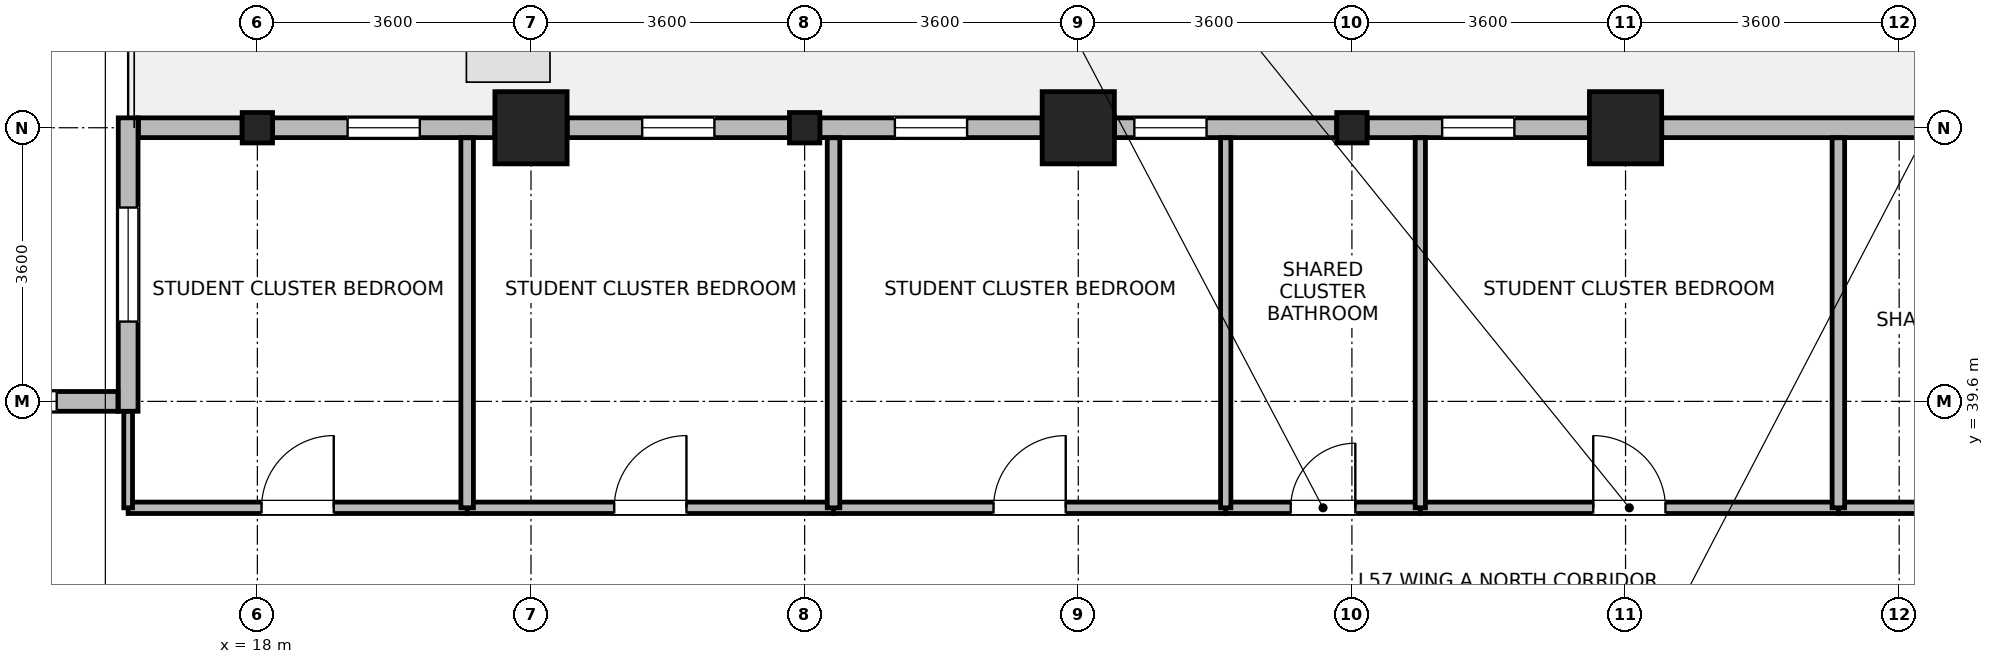
"""IFC4 building model, lengths in metres.
Left out: names, types, materials, properties, quantities, classifications, styles, units other than length and angle.
Written with IfcOpenShell. Run it as: python <this file> out.ifc"""

import sys

from ifc_helpers import new_model, si_unit, direction, frame, frame_2d, origin, origin_2d, place, context, subcontext, project, spatial, rectangle, i_section, extrude, source, transform, mapped, element, fill, save


model = new_model("IFC4")
c1 = context("Model", 3, precision=1e-05, world=origin(), true_north=direction((0.0, 1.0)))
c2 = subcontext(c1, "Body", "Model", "MODEL_VIEW")
j1 = project(units=[si_unit("LENGTHUNIT", "METRE"), si_unit("PLANEANGLEUNIT", "RADIAN")], contexts=[c1])
p1 = place(None, origin())
s1 = spatial("IfcSite", under=j1, at=p1, CompositionType="ELEMENT")
p2 = place(p1, origin())
s2 = spatial("IfcBuilding", under=s1, at=p2, CompositionType="ELEMENT")
p3 = place(p2, frame((0.0, 0.0, 224.0)))
s3 = spatial("IfcBuildingStorey", under=s2, at=p3, CompositionType="ELEMENT", Elevation=224.0)
m1 = source(origin(), c2, "Body", "SweptSolid", [
    extrude(rectangle(XDim=0.95, YDim=0.95, at=origin_2d()), origin(), (0.0, 0.0, 1.0), 3.7),
])
for number, where, z_axis, x_axis in (
    (1, (21.6, 43.2, 0.0), (0.0, 0.0, 1.0), (1.0, 0.0, 0.0)),
    (2, (28.8, 43.2, 0.0), (0.0, 0.0, 1.0), (1.0, 0.0, 0.0)),
    (3, (36.0, 43.2, 0.0), (0.0, 0.0, 1.0), (1.0, 0.0, 0.0)),
):
    element("IfcColumn", number, at=place(p3, frame(where, z_axis=z_axis, x_axis=x_axis)), inside=s3, PredefinedType="COLUMN", context=c2, shape_type="MappedRepresentation", body=[
        mapped(m1, transform((0.0, 0.0, 0.0), x_axis=(1.0, 0.0, 0.0), y_axis=(0.0, 1.0, 0.0), z_axis=(0.0, 0.0, 1.0), scale=1.0)),
    ])
m2 = source(origin(), c2, "Body", "SweptSolid", [
    extrude(i_section(OverallWidth=0.399, OverallDepth=0.4, WebThickness=0.017, FlangeThickness=0.023, FilletRadius=0.015, at=origin_2d()), origin(), (0.0, 0.0, 1.0), 3.7),
])
for number, where, z_axis, x_axis in (
    (4, (18.0, 43.2, 0.0), (0.0, 0.0, 1.0), (1.0, 0.0, 0.0)),
    (5, (25.2, 43.2, 0.0), (0.0, 0.0, 1.0), (1.0, 0.0, 0.0)),
    (6, (32.4, 43.2, 0.0), (0.0, 0.0, 1.0), (1.0, 0.0, 0.0)),
):
    element("IfcColumn", number, at=place(p3, frame(where, z_axis=z_axis, x_axis=x_axis)), inside=s3, PredefinedType="COLUMN", context=c2, shape_type="MappedRepresentation", body=[
        mapped(m2, transform((0.0, 0.0, 0.0), x_axis=(1.0, 0.0, 0.0), y_axis=(0.0, 1.0, 0.0), z_axis=(0.0, 0.0, 1.0), scale=1.0)),
    ])
p4 = place(p3, frame((36.476, 43.2, 0.0), z_axis=(0.0, 0.0, 1.0), x_axis=(1.0, 0.0, 0.0)))
e7 = element("IfcWall", 7, at=p4, inside=s3, PredefinedType="STANDARD", context=c2, shape_type="SweptSolid", body=[
    extrude(rectangle(XDim=9.848, YDim=0.26, at=frame_2d((4.924, 0.0))), origin(), (0.0, 0.0, 1.0), 3.05),
])
p5 = place(p4, frame((4.174, 0.0, 0.85)))
e8 = element("IfcOpeningElement", 8, at=p5, cuts=e7, PredefinedType="OPENING", context=c2, shape_type="SweptSolid", body=[
    extrude(rectangle(XDim=1.5, YDim=1.85, at=frame_2d((0.75, 0.925))), frame((0.0, 0.14, 0.0), z_axis=(0.0, -1.0, 0.0), x_axis=(1.0, 0.0, 0.0)), (0.0, 0.0, 1.0), 0.28),
])
p6 = place(p4, frame((7.457, 0.0, 0.85)))
e9 = element("IfcOpeningElement", 9, at=p6, cuts=e7, PredefinedType="OPENING", context=c2, shape_type="SweptSolid", body=[
    extrude(rectangle(XDim=1.5, YDim=1.85, at=frame_2d((0.75, 0.925))), frame((0.0, 0.14, 0.0), z_axis=(0.0, -1.0, 0.0), x_axis=(1.0, 0.0, 0.0)), (0.0, 0.0, 1.0), 0.28),
])
p7 = place(p3, frame((32.601, 43.2, 0.0), z_axis=(0.0, 0.0, 1.0), x_axis=(1.0, 0.0, 0.0)))
e10 = element("IfcWall", 10, at=p7, inside=s3, PredefinedType="STANDARD", context=c2, shape_type="SweptSolid", body=[
    extrude(rectangle(XDim=2.923, YDim=0.26, at=frame_2d((1.462, 0.0))), origin(), (0.0, 0.0, 1.0), 3.05),
])
p8 = place(p7, frame((0.987, 0.0, 0.85)))
e11 = element("IfcOpeningElement", 11, at=p8, cuts=e10, PredefinedType="OPENING", context=c2, shape_type="SweptSolid", body=[
    extrude(rectangle(XDim=0.95, YDim=1.75, at=frame_2d((0.475, 0.875))), frame((0.0, 0.14, 0.0), z_axis=(0.0, -1.0, 0.0), x_axis=(1.0, 0.0, 0.0)), (0.0, 0.0, 1.0), 0.28),
])
p9 = place(p3, frame((29.276, 43.2, 0.0), z_axis=(0.0, 0.0, 1.0), x_axis=(1.0, 0.0, 0.0)))
e12 = element("IfcWall", 12, at=p9, inside=s3, PredefinedType="STANDARD", context=c2, shape_type="SweptSolid", body=[
    extrude(rectangle(XDim=2.924, YDim=0.26, at=frame_2d((1.462, 0.0))), origin(), (0.0, 0.0, 1.0), 3.05),
])
p10 = place(p9, frame((0.262, 0.0, 0.85)))
e13 = element("IfcOpeningElement", 13, at=p10, cuts=e12, PredefinedType="OPENING", context=c2, shape_type="SweptSolid", body=[
    extrude(rectangle(XDim=0.95, YDim=1.75, at=frame_2d((0.475, 0.875))), frame((0.0, 0.14, 0.0), z_axis=(0.0, -1.0, 0.0), x_axis=(1.0, 0.0, 0.0)), (0.0, 0.0, 1.0), 0.28),
])
p11 = place(p3, frame((25.4, 43.2, 0.0), z_axis=(0.0, 0.0, 1.0), x_axis=(1.0, 0.0, 0.0)))
e14 = element("IfcWall", 14, at=p11, inside=s3, PredefinedType="STANDARD", context=c2, shape_type="SweptSolid", body=[
    extrude(rectangle(XDim=2.924, YDim=0.26, at=frame_2d((1.462, 0.0))), origin(), (0.0, 0.0, 1.0), 3.05),
])
p12 = place(p11, frame((0.987, 0.0, 0.85)))
e15 = element("IfcOpeningElement", 15, at=p12, cuts=e14, PredefinedType="OPENING", context=c2, shape_type="SweptSolid", body=[
    extrude(rectangle(XDim=0.95, YDim=1.75, at=frame_2d((0.475, 0.875))), frame((0.0, 0.14, 0.0), z_axis=(0.0, -1.0, 0.0), x_axis=(1.0, 0.0, 0.0)), (0.0, 0.0, 1.0), 0.28),
])
p13 = place(p3, frame((22.076, 43.2, 0.0), z_axis=(0.0, 0.0, 1.0), x_axis=(1.0, 0.0, 0.0)))
e16 = element("IfcWall", 16, at=p13, inside=s3, PredefinedType="STANDARD", context=c2, shape_type="SweptSolid", body=[
    extrude(rectangle(XDim=2.924, YDim=0.26, at=frame_2d((1.462, 0.0))), origin(), (0.0, 0.0, 1.0), 3.05),
])
p14 = place(p13, frame((0.987, 0.0, 0.85)))
e17 = element("IfcOpeningElement", 17, at=p14, cuts=e16, PredefinedType="OPENING", context=c2, shape_type="SweptSolid", body=[
    extrude(rectangle(XDim=0.95, YDim=1.75, at=frame_2d((0.475, 0.875))), frame((0.0, 0.14, 0.0), z_axis=(0.0, -1.0, 0.0), x_axis=(1.0, 0.0, 0.0)), (0.0, 0.0, 1.0), 0.28),
])
p15 = place(p3, frame((18.2, 43.2, 0.0), z_axis=(0.0, 0.0, 1.0), x_axis=(1.0, 0.0, 0.0)))
e18 = element("IfcWall", 18, at=p15, inside=s3, PredefinedType="STANDARD", context=c2, shape_type="SweptSolid", body=[
    extrude(rectangle(XDim=2.924, YDim=0.26, at=frame_2d((1.462, 0.0))), origin(), (0.0, 0.0, 1.0), 3.05),
])
p16 = place(p15, frame((0.987, 0.0, 0.85)))
e19 = element("IfcOpeningElement", 19, at=p16, cuts=e18, PredefinedType="OPENING", context=c2, shape_type="SweptSolid", body=[
    extrude(rectangle(XDim=0.95, YDim=1.75, at=frame_2d((0.475, 0.875))), frame((0.0, 0.14, 0.0), z_axis=(0.0, -1.0, 0.0), x_axis=(1.0, 0.0, 0.0)), (0.0, 0.0, 1.0), 0.28),
])
p17 = place(p3, frame((16.435, 43.2, 0.0), z_axis=(0.0, 0.0, 1.0), x_axis=(1.0, 0.0, 0.0)))
e20 = element("IfcWall", 20, at=p17, inside=s3, PredefinedType="STANDARD", context=c2, shape_type="SweptSolid", body=[
    extrude(rectangle(XDim=1.365, YDim=0.26, at=frame_2d((0.682, 0.0))), origin(), (0.0, 0.0, 1.0), 3.05),
])
p18 = place(p3, frame((16.3, 39.47, 0.0), z_axis=(0.0, 0.0, 1.0), x_axis=(0.0, 1.0, 0.0)))
e21 = element("IfcWall", 21, at=p18, inside=s3, PredefinedType="STANDARD", context=c2, shape_type="SweptSolid", body=[
    extrude(rectangle(XDim=3.86, YDim=0.26, at=frame_2d((1.93, 0.0))), origin(), (0.0, 0.0, 1.0), 3.45),
])
p19 = place(p18, frame((1.18, 0.0, 0.85)))
e22 = element("IfcOpeningElement", 22, at=p19, cuts=e21, PredefinedType="OPENING", context=c2, shape_type="SweptSolid", body=[
    extrude(rectangle(XDim=1.5, YDim=1.85, at=frame_2d((0.75, 0.925))), frame((0.0, 0.14, 0.0), z_axis=(0.0, -1.0, 0.0), x_axis=(1.0, 0.0, 0.0)), (0.0, 0.0, 1.0), 0.28),
])
p20 = place(p3, frame((6.835, 39.6, 0.0), z_axis=(0.0, 0.0, 1.0), x_axis=(1.0, 0.0, 0.0)))
e23 = element("IfcWall", 23, at=p20, inside=s3, PredefinedType="STANDARD", context=c2, shape_type="SweptSolid", body=[
    extrude(rectangle(XDim=9.33, YDim=0.26, at=frame_2d((4.665, 0.0))), origin(), (0.0, 0.0, 1.0), 3.45),
])
p21 = place(p20, frame((0.805, 0.0, 0.85)))
e24 = element("IfcOpeningElement", 24, at=p21, cuts=e23, PredefinedType="OPENING", context=c2, shape_type="SweptSolid", body=[
    extrude(rectangle(XDim=1.5, YDim=1.85, at=frame_2d((0.75, 0.925))), frame((0.0, 0.14, 0.0), z_axis=(0.0, -1.0, 0.0), x_axis=(1.0, 0.0, 0.0)), (0.0, 0.0, 1.0), 0.28),
])
p22 = place(p20, frame((3.915, 0.0, 0.85)))
e25 = element("IfcOpeningElement", 25, at=p22, cuts=e23, PredefinedType="OPENING", context=c2, shape_type="SweptSolid", body=[
    extrude(rectangle(XDim=1.5, YDim=1.85, at=frame_2d((0.75, 0.925))), frame((0.0, 0.14, 0.0), z_axis=(0.0, -1.0, 0.0), x_axis=(1.0, 0.0, 0.0)), (0.0, 0.0, 1.0), 0.28),
])
p23 = place(p20, frame((7.025, 0.0, 0.85)))
e26 = element("IfcOpeningElement", 26, at=p23, cuts=e23, PredefinedType="OPENING", context=c2, shape_type="SweptSolid", body=[
    extrude(rectangle(XDim=1.5, YDim=1.85, at=frame_2d((0.75, 0.925))), frame((0.0, 0.14, 0.0), z_axis=(0.0, -1.0, 0.0), x_axis=(1.0, 0.0, 0.0)), (0.0, 0.0, 1.0), 0.28),
])
p24 = place(p3, frame((38.8, 38.2, 0.0), z_axis=(0.0, 0.0, 1.0), x_axis=(1.0, 0.0, 0.0)))
e27 = element("IfcWall", 27, at=p24, inside=s3, PredefinedType="PARTITIONING", context=c2, shape_type="SweptSolid", body=[
    extrude(rectangle(XDim=10.44, YDim=0.15, at=frame_2d((5.22, 0.0))), origin(), (0.0, 0.0, 1.0), 3.45),
])
p25 = place(p24, frame((4.77, 0.0, 0.0)))
e28 = element("IfcOpeningElement", 28, at=p25, cuts=e27, PredefinedType="OPENING", context=c2, shape_type="SweptSolid", body=[
    extrude(rectangle(XDim=0.9, YDim=2.08, at=frame_2d((0.45, 1.04))), frame((0.0, 0.085, 0.0), z_axis=(0.0, -1.0, 0.0), x_axis=(1.0, 0.0, 0.0)), (0.0, 0.0, 1.0), 0.17),
])
p26 = place(p3, frame((33.3, 38.2, 0.0), z_axis=(0.0, 0.0, 1.0), x_axis=(1.0, 0.0, 0.0)))
e29 = element("IfcWall", 29, at=p26, inside=s3, PredefinedType="PARTITIONING", context=c2, shape_type="SweptSolid", body=[
    extrude(rectangle(XDim=5.5, YDim=0.15, at=frame_2d((2.75, 0.0))), origin(), (0.0, 0.0, 1.0), 3.45),
])
p27 = place(p26, frame((2.275, 0.0, 0.0)))
e30 = element("IfcOpeningElement", 30, at=p27, cuts=e29, PredefinedType="OPENING", context=c2, shape_type="SweptSolid", body=[
    extrude(rectangle(XDim=0.95, YDim=2.1, at=frame_2d((0.475, 1.05))), frame((0.0, 0.085, 0.0), z_axis=(0.0, -1.0, 0.0), x_axis=(1.0, 0.0, 0.0)), (0.0, 0.0, 1.0), 0.17),
])
p28 = place(p3, frame((25.58, 38.2, 0.0), z_axis=(0.0, 0.0, 1.0), x_axis=(1.0, 0.0, 0.0)))
e31 = element("IfcWall", 31, at=p28, inside=s3, PredefinedType="PARTITIONING", context=c2, shape_type="SweptSolid", body=[
    extrude(rectangle(XDim=5.16, YDim=0.15, at=frame_2d((2.58, 0.0))), origin(), (0.0, 0.0, 1.0), 3.45),
])
p29 = place(p28, frame((2.105, 0.0, 0.0)))
e32 = element("IfcOpeningElement", 32, at=p29, cuts=e31, PredefinedType="OPENING", context=c2, shape_type="SweptSolid", body=[
    extrude(rectangle(XDim=0.95, YDim=2.1, at=frame_2d((0.475, 1.05))), frame((0.0, 0.085, 0.0), z_axis=(0.0, -1.0, 0.0), x_axis=(1.0, 0.0, 0.0)), (0.0, 0.0, 1.0), 0.17),
])
p30 = place(p3, frame((20.76, 38.2, 0.0), z_axis=(0.0, 0.0, 1.0), x_axis=(1.0, 0.0, 0.0)))
e33 = element("IfcWall", 33, at=p30, inside=s3, PredefinedType="PARTITIONING", context=c2, shape_type="SweptSolid", body=[
    extrude(rectangle(XDim=4.82, YDim=0.15, at=frame_2d((2.41, 0.0))), origin(), (0.0, 0.0, 1.0), 3.45),
])
p31 = place(p30, frame((1.935, 0.0, 0.0)))
e34 = element("IfcOpeningElement", 34, at=p31, cuts=e33, PredefinedType="OPENING", context=c2, shape_type="SweptSolid", body=[
    extrude(rectangle(XDim=0.95, YDim=2.1, at=frame_2d((0.475, 1.05))), frame((0.0, 0.085, 0.0), z_axis=(0.0, -1.0, 0.0), x_axis=(1.0, 0.0, 0.0)), (0.0, 0.0, 1.0), 0.17),
])
p32 = place(p3, frame((16.3, 38.2, 0.0), z_axis=(0.0, 0.0, 1.0), x_axis=(1.0, 0.0, 0.0)))
e35 = element("IfcWall", 35, at=p32, inside=s3, PredefinedType="PARTITIONING", context=c2, shape_type="SweptSolid", body=[
    extrude(rectangle(XDim=4.46, YDim=0.15, at=frame_2d((2.23, 0.0))), origin(), (0.0, 0.0, 1.0), 3.45),
])
p33 = place(p32, frame((1.755, 0.0, 0.0)))
e36 = element("IfcOpeningElement", 36, at=p33, cuts=e35, PredefinedType="OPENING", context=c2, shape_type="SweptSolid", body=[
    extrude(rectangle(XDim=0.95, YDim=2.1, at=frame_2d((0.475, 1.05))), frame((0.0, 0.085, 0.0), z_axis=(0.0, -1.0, 0.0), x_axis=(1.0, 0.0, 0.0)), (0.0, 0.0, 1.0), 0.17),
])
p34 = place(p3, frame((30.74, 38.2, 0.0), z_axis=(0.0, 0.0, 1.0), x_axis=(1.0, 0.0, 0.0)))
e37 = element("IfcWall", 37, at=p34, inside=s3, PredefinedType="PARTITIONING", context=c2, shape_type="SweptSolid", body=[
    extrude(rectangle(XDim=2.56, YDim=0.15, at=frame_2d((1.28, 0.0))), origin(), (0.0, 0.0, 1.0), 3.45),
])
p35 = place(p34, frame((0.855, 0.0, 0.0)))
e38 = element("IfcOpeningElement", 38, at=p35, cuts=e37, PredefinedType="OPENING", context=c2, shape_type="SweptSolid", body=[
    extrude(rectangle(XDim=0.85, YDim=2.04, at=frame_2d((0.425, 1.02))), frame((0.0, 0.085, 0.0), z_axis=(0.0, -1.0, 0.0), x_axis=(1.0, 0.0, 0.0)), (0.0, 0.0, 1.0), 0.17),
])
p36 = place(p3, frame((16.3, 38.2, 0.0), z_axis=(0.0, 0.0, 1.0), x_axis=(0.0, 1.0, 0.0)))
e39 = element("IfcWall", 39, at=p36, inside=s3, PredefinedType="PARTITIONING", context=c2, shape_type="SweptSolid", body=[
    extrude(rectangle(XDim=1.268, YDim=0.115, at=frame_2d((0.634, 0.0))), origin(), (0.0, 0.0, 1.0), 3.45),
])
for number, where, z_axis, x_axis in (
    (40, (20.76, 38.2, 0.0), (0.0, 0.0, 1.0), (0.0, 1.0, 0.0)),
    (41, (25.58, 38.2, 0.0), (0.0, 0.0, 1.0), (0.0, 1.0, 0.0)),
):
    element("IfcWall", number, at=place(p3, frame(where, z_axis=z_axis, x_axis=x_axis)), inside=s3, PredefinedType="PARTITIONING", context=c2, shape_type="SweptSolid", body=[
        extrude(rectangle(XDim=4.868, YDim=0.165, at=frame_2d((2.434, 0.0))), origin(), (0.0, 0.0, 1.0), 3.45),
    ])
for number, where, z_axis, x_axis in (
    (42, (30.74, 38.2, 0.0), (0.0, 0.0, 1.0), (0.0, 1.0, 0.0)),
    (43, (33.3, 38.2, 0.0), (0.0, 0.0, 1.0), (0.0, 1.0, 0.0)),
):
    element("IfcWall", number, at=place(p3, frame(where, z_axis=z_axis, x_axis=x_axis)), inside=s3, PredefinedType="PARTITIONING", context=c2, shape_type="SweptSolid", body=[
        extrude(rectangle(XDim=4.868, YDim=0.135, at=frame_2d((2.434, 0.0))), origin(), (0.0, 0.0, 1.0), 3.45),
    ])
p37 = place(p3, frame((38.8, 38.2, 0.0), z_axis=(0.0, 0.0, 1.0), x_axis=(0.0, 1.0, 0.0)))
e44 = element("IfcWall", 44, at=p37, inside=s3, PredefinedType="PARTITIONING", context=c2, shape_type="SweptSolid", body=[
    extrude(rectangle(XDim=4.868, YDim=0.165, at=frame_2d((2.434, 0.0))), origin(), (0.0, 0.0, 1.0), 3.45),
])
p38 = place(p8, origin())
e45 = element("IfcWindow", 45, at=p38, inside=s3, PartitioningType="SINGLE_PANEL", PredefinedType="WINDOW", context=c2, shape_type="SweptSolid", body=[
    extrude(rectangle(XDim=0.95, YDim=1.75, at=frame_2d((0.475, 0.875))), frame((0.0, 0.03, 0.0), z_axis=(0.0, -1.0, 0.0), x_axis=(1.0, 0.0, 0.0)), (0.0, 0.0, 1.0), 0.06),
])
fill(e11, e45)
p39 = place(p10, origin())
e46 = element("IfcWindow", 46, at=p39, inside=s3, PartitioningType="SINGLE_PANEL", PredefinedType="WINDOW", context=c2, shape_type="SweptSolid", body=[
    extrude(rectangle(XDim=0.95, YDim=1.75, at=frame_2d((0.475, 0.875))), frame((0.0, 0.03, 0.0), z_axis=(0.0, -1.0, 0.0), x_axis=(1.0, 0.0, 0.0)), (0.0, 0.0, 1.0), 0.06),
])
fill(e13, e46)
p40 = place(p12, origin())
e47 = element("IfcWindow", 47, at=p40, inside=s3, PartitioningType="SINGLE_PANEL", PredefinedType="WINDOW", context=c2, shape_type="SweptSolid", body=[
    extrude(rectangle(XDim=0.95, YDim=1.75, at=frame_2d((0.475, 0.875))), frame((0.0, 0.03, 0.0), z_axis=(0.0, -1.0, 0.0), x_axis=(1.0, 0.0, 0.0)), (0.0, 0.0, 1.0), 0.06),
])
fill(e15, e47)
p41 = place(p14, origin())
e48 = element("IfcWindow", 48, at=p41, inside=s3, PartitioningType="SINGLE_PANEL", PredefinedType="WINDOW", context=c2, shape_type="SweptSolid", body=[
    extrude(rectangle(XDim=0.95, YDim=1.75, at=frame_2d((0.475, 0.875))), frame((0.0, 0.03, 0.0), z_axis=(0.0, -1.0, 0.0), x_axis=(1.0, 0.0, 0.0)), (0.0, 0.0, 1.0), 0.06),
])
fill(e17, e48)
p42 = place(p16, origin())
e49 = element("IfcWindow", 49, at=p42, inside=s3, PartitioningType="SINGLE_PANEL", PredefinedType="WINDOW", context=c2, shape_type="SweptSolid", body=[
    extrude(rectangle(XDim=0.95, YDim=1.75, at=frame_2d((0.475, 0.875))), frame((0.0, 0.03, 0.0), z_axis=(0.0, -1.0, 0.0), x_axis=(1.0, 0.0, 0.0)), (0.0, 0.0, 1.0), 0.06),
])
fill(e19, e49)
p43 = place(p19, origin())
e50 = element("IfcWindow", 50, at=p43, inside=s3, PartitioningType="SINGLE_PANEL", PredefinedType="WINDOW", context=c2, shape_type="SweptSolid", body=[
    extrude(rectangle(XDim=1.5, YDim=1.85, at=frame_2d((0.75, 0.925))), frame((0.0, 0.03, 0.0), z_axis=(0.0, -1.0, 0.0), x_axis=(1.0, 0.0, 0.0)), (0.0, 0.0, 1.0), 0.06),
])
fill(e22, e50)
p44 = place(p23, origin())
e51 = element("IfcWindow", 51, at=p44, inside=s3, PartitioningType="SINGLE_PANEL", PredefinedType="WINDOW", context=c2, shape_type="SweptSolid", body=[
    extrude(rectangle(XDim=1.5, YDim=1.85, at=frame_2d((0.75, 0.925))), frame((0.0, 0.03, 0.0), z_axis=(0.0, -1.0, 0.0), x_axis=(1.0, 0.0, 0.0)), (0.0, 0.0, 1.0), 0.06),
])
fill(e26, e51)
p45 = place(p27, origin())
e52 = element("IfcDoor", 52, at=p45, inside=s3, OperationType="SINGLE_SWING_LEFT", PredefinedType="DOOR", context=c2, shape_type="SweptSolid", body=[
    extrude(rectangle(XDim=0.95, YDim=2.1, at=frame_2d((0.475, 1.05))), frame((0.0, 0.025, 0.0), z_axis=(0.0, -1.0, 0.0), x_axis=(1.0, 0.0, 0.0)), (0.0, 0.0, 1.0), 0.05),
])
fill(e30, e52)
p46 = place(p29, origin())
e53 = element("IfcDoor", 53, at=p46, inside=s3, OperationType="SINGLE_SWING_RIGHT", PredefinedType="DOOR", context=c2, shape_type="SweptSolid", body=[
    extrude(rectangle(XDim=0.95, YDim=2.1, at=frame_2d((0.475, 1.05))), frame((0.0, 0.025, 0.0), z_axis=(0.0, -1.0, 0.0), x_axis=(1.0, 0.0, 0.0)), (0.0, 0.0, 1.0), 0.05),
])
fill(e32, e53)
p47 = place(p31, origin())
e54 = element("IfcDoor", 54, at=p47, inside=s3, OperationType="SINGLE_SWING_RIGHT", PredefinedType="DOOR", context=c2, shape_type="SweptSolid", body=[
    extrude(rectangle(XDim=0.95, YDim=2.1, at=frame_2d((0.475, 1.05))), frame((0.0, 0.025, 0.0), z_axis=(0.0, -1.0, 0.0), x_axis=(1.0, 0.0, 0.0)), (0.0, 0.0, 1.0), 0.05),
])
fill(e34, e54)
p48 = place(p33, origin())
e55 = element("IfcDoor", 55, at=p48, inside=s3, OperationType="SINGLE_SWING_RIGHT", PredefinedType="DOOR", context=c2, shape_type="SweptSolid", body=[
    extrude(rectangle(XDim=0.95, YDim=2.1, at=frame_2d((0.475, 1.05))), frame((0.0, 0.025, 0.0), z_axis=(0.0, -1.0, 0.0), x_axis=(1.0, 0.0, 0.0)), (0.0, 0.0, 1.0), 0.05),
])
fill(e36, e55)
p49 = place(p35, origin())
e56 = element("IfcDoor", 56, at=p49, inside=s3, OperationType="SINGLE_SWING_RIGHT", PredefinedType="DOOR", context=c2, shape_type="SweptSolid", body=[
    extrude(rectangle(XDim=0.85, YDim=2.04, at=frame_2d((0.425, 1.02))), frame((0.0, 0.025, 0.0), z_axis=(0.0, -1.0, 0.0), x_axis=(1.0, 0.0, 0.0)), (0.0, 0.0, 1.0), 0.05),
])
fill(e38, e56)
save(model, sys.argv[1])
